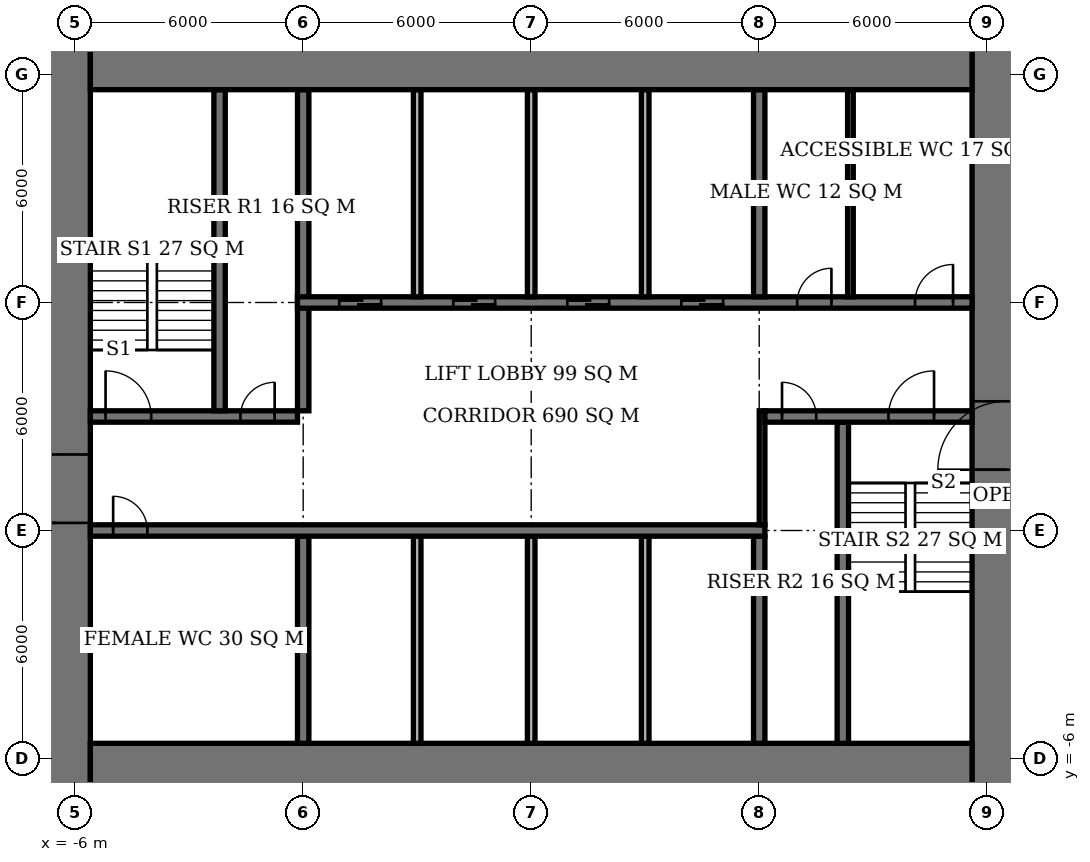
"""IFC4 building model, lengths in metres.
Left out: names, types, materials, properties, quantities, classifications, styles, units other than length and angle.
Written with IfcOpenShell. Run it as: python <this file> out.ifc"""

import sys

from ifc_helpers import new_model, si_unit, direction, frame, frame_2d, origin, place, context, subcontext, project, spatial, rectangle, extrude, element, fill, save


model = new_model("IFC4")
c1 = context("Model", 3, precision=1e-05, world=origin(), true_north=direction((0.0, 1.0)))
c2 = subcontext(c1, "Body", "Model", "MODEL_VIEW")
j1 = project(units=[si_unit("LENGTHUNIT", "METRE"), si_unit("PLANEANGLEUNIT", "RADIAN")], contexts=[c1])
p1 = place(None, origin())
s1 = spatial("IfcSite", under=j1, at=p1, CompositionType="ELEMENT")
p2 = place(p1, origin())
s2 = spatial("IfcBuilding", under=s1, at=p2, CompositionType="ELEMENT")
p3 = place(p2, frame((0.0, 0.0, 49.4)))
s3 = spatial("IfcBuildingStorey", under=s2, at=p3, CompositionType="ELEMENT", Elevation=49.4)
for number, where, z_axis, x_axis in (
    (1, (-5.6, -6.6, 0.0), (0.0, 0.0, 1.0), (1.0, 0.0, 0.0)),
    (2, (-5.6, 12.6, 0.0), (0.0, 0.0, 1.0), (1.0, 0.0, 0.0)),
):
    element("IfcWall", number, at=place(p3, frame(where, z_axis=z_axis, x_axis=x_axis)), inside=s3, PredefinedType="SHEAR", context=c2, shape_type="SweptSolid", body=[
        extrude(rectangle(XDim=23.2, YDim=2.0, at=frame_2d((11.6, 0.0))), origin(), (0.0, 0.0, 1.0), 3.9),
    ])
p4 = place(p3, frame((-6.5, -7.6, 0.0), z_axis=(0.0, 0.0, 1.0), x_axis=(0.0, 1.0, 0.0)))
e3 = element("IfcWall", 3, at=p4, inside=s3, PredefinedType="SHEAR", context=c2, shape_type="SweptSolid", body=[
    extrude(rectangle(XDim=21.2, YDim=1.8, at=frame_2d((10.6, 0.0))), origin(), (0.0, 0.0, 1.0), 3.9),
])
p5 = place(p4, frame((7.8, 0.0, 0.0)))
e4 = element("IfcOpeningElement", 4, at=p5, cuts=e3, PredefinedType="OPENING", context=c2, shape_type="SweptSolid", body=[
    extrude(rectangle(XDim=1.8, YDim=2.4, at=frame_2d((0.9, 1.2))), frame((0.0, 0.91, 0.0), z_axis=(0.0, -1.0, 0.0), x_axis=(1.0, 0.0, 0.0)), (0.0, 0.0, 1.0), 1.82),
])
p6 = place(p3, frame((18.5, -7.6, 0.0), z_axis=(0.0, 0.0, 1.0), x_axis=(0.0, 1.0, 0.0)))
e5 = element("IfcWall", 5, at=p6, inside=s3, PredefinedType="SHEAR", context=c2, shape_type="SweptSolid", body=[
    extrude(rectangle(XDim=21.2, YDim=1.8, at=frame_2d((10.6, 0.0))), origin(), (0.0, 0.0, 1.0), 3.9),
])
p7 = place(p6, frame((9.2, 0.0, 0.0)))
e6 = element("IfcOpeningElement", 6, at=p7, cuts=e5, PredefinedType="OPENING", context=c2, shape_type="SweptSolid", body=[
    extrude(rectangle(XDim=1.8, YDim=2.4, at=frame_2d((0.9, 1.2))), frame((0.0, 0.91, 0.0), z_axis=(0.0, -1.0, 0.0), x_axis=(1.0, 0.0, 0.0)), (0.0, 0.0, 1.0), 1.82),
])
p8 = place(p3, frame((-5.6, 0.0, 0.0), z_axis=(0.0, 0.0, 1.0), x_axis=(1.0, 0.0, 0.0)))
e7 = element("IfcWall", 7, at=p8, inside=s3, PredefinedType="SHEAR", context=c2, shape_type="SweptSolid", body=[
    extrude(rectangle(XDim=17.75, YDim=0.3, at=frame_2d((8.875, 0.0))), origin(), (0.0, 0.0, 1.0), 3.9),
])
p9 = place(p8, frame((0.6, 0.0, 0.0)))
e8 = element("IfcOpeningElement", 8, at=p9, cuts=e7, PredefinedType="OPENING", context=c2, shape_type="SweptSolid", body=[
    extrude(rectangle(XDim=0.9, YDim=2.1, at=frame_2d((0.45, 1.05))), frame((0.0, 0.16, 0.0), z_axis=(0.0, -1.0, 0.0), x_axis=(1.0, 0.0, 0.0)), (0.0, 0.0, 1.0), 0.32),
])
p10 = place(p3, frame((-5.6, 3.0, 0.0), z_axis=(0.0, 0.0, 1.0), x_axis=(1.0, 0.0, 0.0)))
e9 = element("IfcWall", 9, at=p10, inside=s3, PredefinedType="SHEAR", context=c2, shape_type="SweptSolid", body=[
    extrude(rectangle(XDim=5.45, YDim=0.3, at=frame_2d((2.725, 0.0))), origin(), (0.0, 0.0, 1.0), 3.9),
])
p11 = place(p10, frame((0.4, 0.0, 0.0)))
e10 = element("IfcOpeningElement", 10, at=p11, cuts=e9, PredefinedType="OPENING", context=c2, shape_type="SweptSolid", body=[
    extrude(rectangle(XDim=1.2, YDim=2.1, at=frame_2d((0.6, 1.05))), frame((0.0, 0.16, 0.0), z_axis=(0.0, -1.0, 0.0), x_axis=(1.0, 0.0, 0.0)), (0.0, 0.0, 1.0), 0.32),
])
p12 = place(p10, frame((3.95, 0.0, 0.0)))
e11 = element("IfcOpeningElement", 11, at=p12, cuts=e9, PredefinedType="OPENING", context=c2, shape_type="SweptSolid", body=[
    extrude(rectangle(XDim=0.9, YDim=2.1, at=frame_2d((0.45, 1.05))), frame((0.0, 0.16, 0.0), z_axis=(0.0, -1.0, 0.0), x_axis=(1.0, 0.0, 0.0)), (0.0, 0.0, 1.0), 0.32),
])
p13 = place(p3, frame((12.15, 3.0, 0.0), z_axis=(0.0, 0.0, 1.0), x_axis=(1.0, 0.0, 0.0)))
e12 = element("IfcWall", 12, at=p13, inside=s3, PredefinedType="SHEAR", context=c2, shape_type="SweptSolid", body=[
    extrude(rectangle(XDim=5.45, YDim=0.3, at=frame_2d((2.725, 0.0))), origin(), (0.0, 0.0, 1.0), 3.9),
])
p14 = place(p13, frame((3.25, 0.0, 0.0)))
e13 = element("IfcOpeningElement", 13, at=p14, cuts=e12, PredefinedType="OPENING", context=c2, shape_type="SweptSolid", body=[
    extrude(rectangle(XDim=1.2, YDim=2.1, at=frame_2d((0.6, 1.05))), frame((0.0, 0.16, 0.0), z_axis=(0.0, -1.0, 0.0), x_axis=(1.0, 0.0, 0.0)), (0.0, 0.0, 1.0), 0.32),
])
p15 = place(p13, frame((0.45, 0.0, 0.0)))
e14 = element("IfcOpeningElement", 14, at=p15, cuts=e12, PredefinedType="OPENING", context=c2, shape_type="SweptSolid", body=[
    extrude(rectangle(XDim=0.9, YDim=2.1, at=frame_2d((0.45, 1.05))), frame((0.0, 0.16, 0.0), z_axis=(0.0, -1.0, 0.0), x_axis=(1.0, 0.0, 0.0)), (0.0, 0.0, 1.0), 0.32),
])
p16 = place(p3, frame((-0.15, 6.0, 0.0), z_axis=(0.0, 0.0, 1.0), x_axis=(1.0, 0.0, 0.0)))
e15 = element("IfcWall", 15, at=p16, inside=s3, PredefinedType="SHEAR", context=c2, shape_type="SweptSolid", body=[
    extrude(rectangle(XDim=17.75, YDim=0.3, at=frame_2d((8.875, 0.0))), origin(), (0.0, 0.0, 1.0), 3.9),
])
p17 = place(p16, frame((13.15, 0.0, 0.0)))
e16 = element("IfcOpeningElement", 16, at=p17, cuts=e15, PredefinedType="OPENING", context=c2, shape_type="SweptSolid", body=[
    extrude(rectangle(XDim=0.9, YDim=2.1, at=frame_2d((0.45, 1.05))), frame((0.0, 0.16, 0.0), z_axis=(0.0, -1.0, 0.0), x_axis=(1.0, 0.0, 0.0)), (0.0, 0.0, 1.0), 0.32),
])
p18 = place(p16, frame((16.25, 0.0, 0.0)))
e17 = element("IfcOpeningElement", 17, at=p18, cuts=e15, PredefinedType="OPENING", context=c2, shape_type="SweptSolid", body=[
    extrude(rectangle(XDim=1.0, YDim=2.1, at=frame_2d((0.5, 1.05))), frame((0.0, 0.16, 0.0), z_axis=(0.0, -1.0, 0.0), x_axis=(1.0, 0.0, 0.0)), (0.0, 0.0, 1.0), 0.32),
])
p19 = place(p16, frame((1.1, 0.0, 0.0)))
e18 = element("IfcOpeningElement", 18, at=p19, cuts=e15, PredefinedType="OPENING", context=c2, shape_type="SweptSolid", body=[
    extrude(rectangle(XDim=1.1, YDim=2.1, at=frame_2d((0.55, 1.05))), frame((0.0, 0.16, 0.0), z_axis=(0.0, -1.0, 0.0), x_axis=(1.0, 0.0, 0.0)), (0.0, 0.0, 1.0), 0.32),
])
p20 = place(p16, frame((4.1, 0.0, 0.0)))
e19 = element("IfcOpeningElement", 19, at=p20, cuts=e15, PredefinedType="OPENING", context=c2, shape_type="SweptSolid", body=[
    extrude(rectangle(XDim=1.1, YDim=2.1, at=frame_2d((0.55, 1.05))), frame((0.0, 0.16, 0.0), z_axis=(0.0, -1.0, 0.0), x_axis=(1.0, 0.0, 0.0)), (0.0, 0.0, 1.0), 0.32),
])
p21 = place(p16, frame((7.1, 0.0, 0.0)))
e20 = element("IfcOpeningElement", 20, at=p21, cuts=e15, PredefinedType="OPENING", context=c2, shape_type="SweptSolid", body=[
    extrude(rectangle(XDim=1.1, YDim=2.1, at=frame_2d((0.55, 1.05))), frame((0.0, 0.16, 0.0), z_axis=(0.0, -1.0, 0.0), x_axis=(1.0, 0.0, 0.0)), (0.0, 0.0, 1.0), 0.32),
])
p22 = place(p16, frame((10.1, 0.0, 0.0)))
e21 = element("IfcOpeningElement", 21, at=p22, cuts=e15, PredefinedType="OPENING", context=c2, shape_type="SweptSolid", body=[
    extrude(rectangle(XDim=1.1, YDim=2.1, at=frame_2d((0.55, 1.05))), frame((0.0, 0.16, 0.0), z_axis=(0.0, -1.0, 0.0), x_axis=(1.0, 0.0, 0.0)), (0.0, 0.0, 1.0), 0.32),
])
p23 = place(p3, frame((0.0, -5.6, 0.0), z_axis=(0.0, 0.0, 1.0), x_axis=(0.0, 1.0, 0.0)))
e22 = element("IfcWall", 22, at=p23, inside=s3, PredefinedType="SHEAR", context=c2, shape_type="SweptSolid", body=[
    extrude(rectangle(XDim=5.45, YDim=0.3, at=frame_2d((2.725, 0.0))), origin(), (0.0, 0.0, 1.0), 3.9),
])
p24 = place(p3, frame((0.0, 3.15, 0.0), z_axis=(0.0, 0.0, 1.0), x_axis=(0.0, 1.0, 0.0)))
e23 = element("IfcWall", 23, at=p24, inside=s3, PredefinedType="SHEAR", context=c2, shape_type="SweptSolid", body=[
    extrude(rectangle(XDim=8.45, YDim=0.3, at=frame_2d((4.225, 0.0))), origin(), (0.0, 0.0, 1.0), 3.9),
])
for number, where, z_axis, x_axis in (
    (24, (12.0, -5.6, 0.0), (0.0, 0.0, 1.0), (0.0, 1.0, 0.0)),
    (25, (12.0, 6.15, 0.0), (0.0, 0.0, 1.0), (0.0, 1.0, 0.0)),
):
    element("IfcWall", number, at=place(p3, frame(where, z_axis=z_axis, x_axis=x_axis)), inside=s3, PredefinedType="SHEAR", context=c2, shape_type="SweptSolid", body=[
        extrude(rectangle(XDim=5.45, YDim=0.3, at=frame_2d((2.725, 0.0))), origin(), (0.0, 0.0, 1.0), 3.9),
    ])
for number, where, z_axis, x_axis in (
    (26, (-2.2, 3.15, 0.0), (0.0, 0.0, 1.0), (0.0, 1.0, 0.0)),
    (27, (14.2, -5.6, 0.0), (0.0, 0.0, 1.0), (0.0, 1.0, 0.0)),
):
    element("IfcWall", number, at=place(p3, frame(where, z_axis=z_axis, x_axis=x_axis)), inside=s3, PredefinedType="SHEAR", context=c2, shape_type="SweptSolid", body=[
        extrude(rectangle(XDim=8.45, YDim=0.3, at=frame_2d((4.225, 0.0))), origin(), (0.0, 0.0, 1.0), 3.9),
    ])
for number, where, z_axis, x_axis in (
    (28, (3.0, 6.15, 0.0), (0.0, 0.0, 1.0), (0.0, 1.0, 0.0)),
    (29, (6.0, 6.15, 0.0), (0.0, 0.0, 1.0), (0.0, 1.0, 0.0)),
    (30, (9.0, 6.15, 0.0), (0.0, 0.0, 1.0), (0.0, 1.0, 0.0)),
    (31, (3.0, -5.6, 0.0), (0.0, 0.0, 1.0), (0.0, 1.0, 0.0)),
    (32, (6.0, -5.6, 0.0), (0.0, 0.0, 1.0), (0.0, 1.0, 0.0)),
    (33, (9.0, -5.6, 0.0), (0.0, 0.0, 1.0), (0.0, 1.0, 0.0)),
):
    element("IfcWall", number, at=place(p3, frame(where, z_axis=z_axis, x_axis=x_axis)), inside=s3, PredefinedType="SOLIDWALL", context=c2, shape_type="SweptSolid", body=[
        extrude(rectangle(XDim=5.45, YDim=0.2, at=frame_2d((2.725, 0.0))), origin(), (0.0, 0.0, 1.0), 3.9),
    ])
p25 = place(p3, frame((14.4, 6.15, 0.0), z_axis=(0.0, 0.0, 1.0), x_axis=(0.0, 1.0, 0.0)))
e34 = element("IfcWall", 34, at=p25, inside=s3, PredefinedType="PLUMBINGWALL", context=c2, shape_type="SweptSolid", body=[
    extrude(rectangle(XDim=5.45, YDim=0.15, at=frame_2d((2.725, 0.0))), origin(), (0.0, 0.0, 1.0), 3.65),
])
p26 = place(p3, frame((12.075, 0.15, 0.0), z_axis=(0.0, 0.0, 1.0), x_axis=(0.0, 1.0, 0.0)))
e35 = element("IfcWall", 35, at=p26, inside=s3, PredefinedType="PARTITIONING", context=c2, shape_type="SweptSolid", body=[
    extrude(rectangle(XDim=3.0, YDim=0.15, at=frame_2d((1.5, 0.0))), origin(), (0.0, 0.0, 1.0), 3.65),
])
p27 = place(p5, origin())
e36 = element("IfcDoor", 36, at=p27, inside=s3, OperationType="DOUBLE_DOOR_SINGLE_SWING", PredefinedType="DOOR", context=c2, shape_type="SweptSolid", body=[
    extrude(rectangle(XDim=1.8, YDim=2.4, at=frame_2d((0.9, 1.2))), frame((0.0, 0.025, 0.0), z_axis=(0.0, -1.0, 0.0), x_axis=(1.0, 0.0, 0.0)), (0.0, 0.0, 1.0), 0.05),
])
fill(e4, e36)
p28 = place(p7, origin())
e37 = element("IfcDoor", 37, at=p28, inside=s3, OperationType="DOUBLE_DOOR_SINGLE_SWING", PredefinedType="DOOR", context=c2, shape_type="SweptSolid", body=[
    extrude(rectangle(XDim=1.8, YDim=2.4, at=frame_2d((0.9, 1.2))), frame((0.0, 0.025, 0.0), z_axis=(0.0, -1.0, 0.0), x_axis=(1.0, 0.0, 0.0)), (0.0, 0.0, 1.0), 0.05),
])
fill(e6, e37)
p29 = place(p11, origin())
e38 = element("IfcDoor", 38, at=p29, inside=s3, OperationType="SINGLE_SWING_LEFT", PredefinedType="DOOR", context=c2, shape_type="SweptSolid", body=[
    extrude(rectangle(XDim=1.2, YDim=2.1, at=frame_2d((0.6, 1.05))), frame((0.0, 0.025, 0.0), z_axis=(0.0, -1.0, 0.0), x_axis=(1.0, 0.0, 0.0)), (0.0, 0.0, 1.0), 0.05),
])
fill(e10, e38)
p30 = place(p12, origin())
e39 = element("IfcDoor", 39, at=p30, inside=s3, OperationType="SINGLE_SWING_RIGHT", PredefinedType="DOOR", context=c2, shape_type="SweptSolid", body=[
    extrude(rectangle(XDim=0.9, YDim=2.1, at=frame_2d((0.45, 1.05))), frame((0.0, 0.025, 0.0), z_axis=(0.0, -1.0, 0.0), x_axis=(1.0, 0.0, 0.0)), (0.0, 0.0, 1.0), 0.05),
])
fill(e11, e39)
p31 = place(p14, origin())
e40 = element("IfcDoor", 40, at=p31, inside=s3, OperationType="SINGLE_SWING_RIGHT", PredefinedType="DOOR", context=c2, shape_type="SweptSolid", body=[
    extrude(rectangle(XDim=1.2, YDim=2.1, at=frame_2d((0.6, 1.05))), frame((0.0, 0.025, 0.0), z_axis=(0.0, -1.0, 0.0), x_axis=(1.0, 0.0, 0.0)), (0.0, 0.0, 1.0), 0.05),
])
fill(e13, e40)
p32 = place(p15, origin())
e41 = element("IfcDoor", 41, at=p32, inside=s3, OperationType="SINGLE_SWING_LEFT", PredefinedType="DOOR", context=c2, shape_type="SweptSolid", body=[
    extrude(rectangle(XDim=0.9, YDim=2.1, at=frame_2d((0.45, 1.05))), frame((0.0, 0.025, 0.0), z_axis=(0.0, -1.0, 0.0), x_axis=(1.0, 0.0, 0.0)), (0.0, 0.0, 1.0), 0.05),
])
fill(e14, e41)
p33 = place(p9, origin())
e42 = element("IfcDoor", 42, at=p33, inside=s3, OperationType="SINGLE_SWING_LEFT", PredefinedType="DOOR", context=c2, shape_type="SweptSolid", body=[
    extrude(rectangle(XDim=0.9, YDim=2.1, at=frame_2d((0.45, 1.05))), frame((0.0, 0.025, 0.0), z_axis=(0.0, -1.0, 0.0), x_axis=(1.0, 0.0, 0.0)), (0.0, 0.0, 1.0), 0.05),
])
fill(e8, e42)
p34 = place(p17, origin())
e43 = element("IfcDoor", 43, at=p34, inside=s3, OperationType="SINGLE_SWING_RIGHT", PredefinedType="DOOR", context=c2, shape_type="SweptSolid", body=[
    extrude(rectangle(XDim=0.9, YDim=2.1, at=frame_2d((0.45, 1.05))), frame((0.0, 0.025, 0.0), z_axis=(0.0, -1.0, 0.0), x_axis=(1.0, 0.0, 0.0)), (0.0, 0.0, 1.0), 0.05),
])
fill(e16, e43)
p35 = place(p18, origin())
e44 = element("IfcDoor", 44, at=p35, inside=s3, OperationType="SINGLE_SWING_RIGHT", PredefinedType="DOOR", context=c2, shape_type="SweptSolid", body=[
    extrude(rectangle(XDim=1.0, YDim=2.1, at=frame_2d((0.5, 1.05))), frame((0.0, 0.025, 0.0), z_axis=(0.0, -1.0, 0.0), x_axis=(1.0, 0.0, 0.0)), (0.0, 0.0, 1.0), 0.05),
])
fill(e17, e44)
p36 = place(p19, origin())
e45 = element("IfcDoor", 45, at=p36, inside=s3, OperationType="DOUBLE_DOOR_SLIDING", PredefinedType="USERDEFINED", context=c2, shape_type="SweptSolid", body=[
    extrude(rectangle(XDim=1.1, YDim=2.1, at=frame_2d((0.55, 1.05))), frame((0.0, 0.025, 0.0), z_axis=(0.0, -1.0, 0.0), x_axis=(1.0, 0.0, 0.0)), (0.0, 0.0, 1.0), 0.05),
])
fill(e18, e45)
p37 = place(p20, origin())
e46 = element("IfcDoor", 46, at=p37, inside=s3, OperationType="DOUBLE_DOOR_SLIDING", PredefinedType="USERDEFINED", context=c2, shape_type="SweptSolid", body=[
    extrude(rectangle(XDim=1.1, YDim=2.1, at=frame_2d((0.55, 1.05))), frame((0.0, 0.025, 0.0), z_axis=(0.0, -1.0, 0.0), x_axis=(1.0, 0.0, 0.0)), (0.0, 0.0, 1.0), 0.05),
])
fill(e19, e46)
p38 = place(p21, origin())
e47 = element("IfcDoor", 47, at=p38, inside=s3, OperationType="DOUBLE_DOOR_SLIDING", PredefinedType="USERDEFINED", context=c2, shape_type="SweptSolid", body=[
    extrude(rectangle(XDim=1.1, YDim=2.1, at=frame_2d((0.55, 1.05))), frame((0.0, 0.025, 0.0), z_axis=(0.0, -1.0, 0.0), x_axis=(1.0, 0.0, 0.0)), (0.0, 0.0, 1.0), 0.05),
])
fill(e20, e47)
p39 = place(p22, origin())
e48 = element("IfcDoor", 48, at=p39, inside=s3, OperationType="DOUBLE_DOOR_SLIDING", PredefinedType="USERDEFINED", context=c2, shape_type="SweptSolid", body=[
    extrude(rectangle(XDim=1.1, YDim=2.1, at=frame_2d((0.55, 1.05))), frame((0.0, 0.025, 0.0), z_axis=(0.0, -1.0, 0.0), x_axis=(1.0, 0.0, 0.0)), (0.0, 0.0, 1.0), 0.05),
])
fill(e21, e48)
save(model, sys.argv[1])
